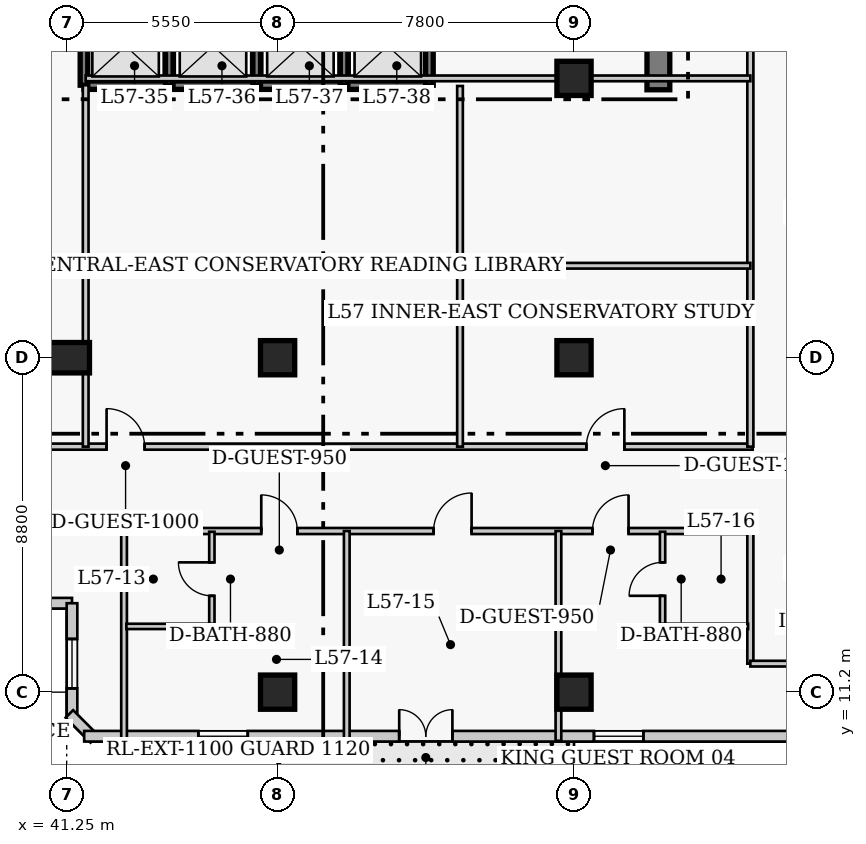
"""IFC4 building model, lengths in metres.
Left out: names, types, materials, properties, quantities, classifications, styles, units other than length and angle.
Written with IfcOpenShell. Run it as: python <this file> out.ifc"""

import sys

from ifc_helpers import new_model, si_unit, direction, frame, frame_2d, origin, origin_2d, place, context, subcontext, project, spatial, rectangle, extrude, element, fill, save


model = new_model("IFC4")
c1 = context("Model", 3, precision=1e-05, world=origin(), true_north=direction((0.0, 1.0)))
c2 = subcontext(c1, "Body", "Model", "MODEL_VIEW")
j1 = project(units=[si_unit("LENGTHUNIT", "METRE"), si_unit("PLANEANGLEUNIT", "RADIAN")], contexts=[c1])
p1 = place(None, origin())
s1 = spatial("IfcSite", under=j1, at=p1, CompositionType="ELEMENT")
p2 = place(p1, origin())
s2 = spatial("IfcBuilding", under=s1, at=p2, CompositionType="ELEMENT")
p3 = place(p2, frame((0.0, 0.0, 228.0)))
s3 = spatial("IfcBuildingStorey", under=s2, at=p3, CompositionType="ELEMENT", Elevation=228.0)
p4 = place(p3, frame((56.82, 27.05, 0.0), z_axis=(0.0, 0.0, 1.0), x_axis=(0.0, 1.0, 0.0)))
e1 = element("IfcWall", 1, at=p4, inside=s3, PredefinedType="SHEAR", context=c2, shape_type="SweptSolid", body=[
    extrude(rectangle(XDim=13.57, YDim=0.6, at=frame_2d((6.785, 0.0))), origin(), (0.0, 0.0, 1.0), 3.9),
])
p5 = place(p3, frame((41.25, 20.0, 0.0), z_axis=(0.0, 0.0, 1.0), x_axis=(1.0, 0.0, 0.0)))
e2 = element("IfcColumn", 2, at=p5, inside=s3, PredefinedType="COLUMN", context=c2, shape_type="SweptSolid", body=[
    extrude(rectangle(XDim=1.2, YDim=0.8, at=origin_2d()), origin(), (0.0, 0.0, 1.0), 3.9),
])
for number, where, z_axis, x_axis in (
    (3, (46.8, 11.2, 0.0), (0.0, 0.0, 1.0), (1.0, 0.0, 0.0)),
    (4, (46.8, 20.0, 0.0), (0.0, 0.0, 1.0), (1.0, 0.0, 0.0)),
    (5, (54.6, 11.2, 0.0), (0.0, 0.0, 1.0), (1.0, 0.0, 0.0)),
    (6, (54.6, 20.0, 0.0), (0.0, 0.0, 1.0), (1.0, 0.0, 0.0)),
    (7, (54.6, 27.35, 0.0), (0.0, 0.0, 1.0), (1.0, 0.0, 0.0)),
):
    element("IfcColumn", number, at=place(p3, frame(where, z_axis=z_axis, x_axis=x_axis)), inside=s3, PredefinedType="COLUMN", context=c2, shape_type="SweptSolid", body=[
        extrude(rectangle(XDim=0.9, YDim=0.9, at=origin_2d()), origin(), (0.0, 0.0, 1.0), 3.9),
    ])
p6 = place(p3, frame((36.61, 13.54, 0.0), z_axis=(0.0, 0.0, 1.0), x_axis=(1.0, 0.0, 0.0)))
e8 = element("IfcWall", 8, at=p6, inside=s3, PredefinedType="SOLIDWALL", context=c2, shape_type="SweptSolid", body=[
    extrude(rectangle(XDim=4.78, YDim=0.28, at=frame_2d((2.39, 0.0))), origin(), (0.0, 0.0, 1.0), 3.56),
])
p7 = place(p6, frame((1.74, 0.0, 0.85)))
e9 = element("IfcOpeningElement", 9, at=p7, cuts=e8, PredefinedType="OPENING", context=c2, shape_type="SweptSolid", body=[
    extrude(rectangle(XDim=1.3, YDim=1.7, at=frame_2d((0.65, 0.85))), frame((0.0, 0.15, 0.0), z_axis=(0.0, -1.0, 0.0), x_axis=(1.0, 0.0, 0.0)), (0.0, 0.0, 1.0), 0.3),
])
p8 = place(p3, frame((41.39, 13.54, 0.0), z_axis=(0.0, 0.0, 1.0), x_axis=(0.0, -1.0, 0.0)))
e10 = element("IfcWall", 10, at=p8, inside=s3, PredefinedType="SOLIDWALL", context=c2, shape_type="SweptSolid", body=[
    extrude(rectangle(XDim=3.18, YDim=0.28, at=frame_2d((1.59, 0.0))), origin(), (0.0, 0.0, 1.0), 3.56),
])
p9 = place(p8, frame((0.94, 0.0, 0.85)))
e11 = element("IfcOpeningElement", 11, at=p9, cuts=e10, PredefinedType="OPENING", context=c2, shape_type="SweptSolid", body=[
    extrude(rectangle(XDim=1.3, YDim=1.7, at=frame_2d((0.65, 0.85))), frame((0.0, 0.15, 0.0), z_axis=(0.0, -1.0, 0.0), x_axis=(1.0, 0.0, 0.0)), (0.0, 0.0, 1.0), 0.3),
])
p10 = place(p3, frame((41.321, 10.627, 0.0), z_axis=(0.0, 0.0, 1.0), x_axis=(0.707106781187, -0.707106781187, 0.0)))
e12 = element("IfcWall", 12, at=p10, inside=s3, PredefinedType="SOLIDWALL", context=c2, shape_type="SweptSolid", body=[
    extrude(rectangle(XDim=0.928, YDim=0.28, at=frame_2d((0.464, 0.0))), origin(), (0.0, 0.0, 1.0), 3.56),
])
p11 = place(p3, frame((41.71, 10.04, 0.0), z_axis=(0.0, 0.0, 1.0), x_axis=(1.0, 0.0, 0.0)))
e13 = element("IfcWall", 13, at=p11, inside=s3, PredefinedType="SOLIDWALL", context=c2, shape_type="SweptSolid", body=[
    extrude(rectangle(XDim=25.83, YDim=0.28, at=frame_2d((12.915, 0.0))), origin(), (0.0, 0.0, 1.0), 3.56),
])
p12 = place(p11, frame((8.29, 0.0, 0.0)))
e14 = element("IfcOpeningElement", 14, at=p12, cuts=e13, PredefinedType="OPENING", context=c2, shape_type="SweptSolid", body=[
    extrude(rectangle(XDim=1.4, YDim=2.15, at=frame_2d((0.7, 1.075))), frame((0.0, 0.15, 0.0), z_axis=(0.0, -1.0, 0.0), x_axis=(1.0, 0.0, 0.0)), (0.0, 0.0, 1.0), 0.3),
])
p13 = place(p11, frame((3.005, 0.0, 0.85)))
e15 = element("IfcOpeningElement", 15, at=p13, cuts=e13, PredefinedType="OPENING", context=c2, shape_type="SweptSolid", body=[
    extrude(rectangle(XDim=1.3, YDim=1.7, at=frame_2d((0.65, 0.85))), frame((0.0, 0.15, 0.0), z_axis=(0.0, -1.0, 0.0), x_axis=(1.0, 0.0, 0.0)), (0.0, 0.0, 1.0), 0.3),
])
p14 = place(p11, frame((13.415, 0.0, 0.85)))
e16 = element("IfcOpeningElement", 16, at=p14, cuts=e13, PredefinedType="OPENING", context=c2, shape_type="SweptSolid", body=[
    extrude(rectangle(XDim=1.3, YDim=1.7, at=frame_2d((0.65, 0.85))), frame((0.0, 0.15, 0.0), z_axis=(0.0, -1.0, 0.0), x_axis=(1.0, 0.0, 0.0)), (0.0, 0.0, 1.0), 0.3),
])
p15 = place(p11, frame((21.525, 0.0, 0.85)))
e17 = element("IfcOpeningElement", 17, at=p15, cuts=e13, PredefinedType="OPENING", context=c2, shape_type="SweptSolid", body=[
    extrude(rectangle(XDim=1.3, YDim=1.7, at=frame_2d((0.65, 0.85))), frame((0.0, 0.15, 0.0), z_axis=(0.0, -1.0, 0.0), x_axis=(1.0, 0.0, 0.0)), (0.0, 0.0, 1.0), 0.3),
])
p16 = place(p3, frame((41.705, 27.17, 0.0), z_axis=(0.0, 0.0, 1.0), x_axis=(1.0, 0.0, 0.0)))
e18 = element("IfcWall", 18, at=p16, inside=s3, PredefinedType="SHEAR", context=c2, shape_type="SweptSolid", body=[
    extrude(rectangle(XDim=2.245, YDim=0.22, at=frame_2d((1.123, 0.0))), origin(), (0.0, 0.0, 1.0), 3.9),
])
p17 = place(p3, frame((41.705, 27.17, 0.0), z_axis=(0.0, 0.0, 1.0), x_axis=(0.0, 1.0, 0.0)))
e19 = element("IfcWall", 19, at=p17, inside=s3, PredefinedType="SHEAR", context=c2, shape_type="SweptSolid", body=[
    extrude(rectangle(XDim=2.06, YDim=0.2, at=frame_2d((1.03, 0.0))), origin(), (0.0, 0.0, 1.0), 3.9),
])
p18 = place(p3, frame((43.95, 27.17, 0.0), z_axis=(0.0, 0.0, 1.0), x_axis=(1.0, 0.0, 0.0)))
e20 = element("IfcWall", 20, at=p18, inside=s3, PredefinedType="SHEAR", context=c2, shape_type="SweptSolid", body=[
    extrude(rectangle(XDim=2.3, YDim=0.22, at=frame_2d((1.15, 0.0))), origin(), (0.0, 0.0, 1.0), 3.9),
])
p19 = place(p3, frame((43.95, 27.17, 0.0), z_axis=(0.0, 0.0, 1.0), x_axis=(0.0, 1.0, 0.0)))
e21 = element("IfcWall", 21, at=p19, inside=s3, PredefinedType="SHEAR", context=c2, shape_type="SweptSolid", body=[
    extrude(rectangle(XDim=2.06, YDim=0.2, at=frame_2d((1.03, 0.0))), origin(), (0.0, 0.0, 1.0), 3.9),
])
p20 = place(p3, frame((46.25, 27.17, 0.0), z_axis=(0.0, 0.0, 1.0), x_axis=(1.0, 0.0, 0.0)))
e22 = element("IfcWall", 22, at=p20, inside=s3, PredefinedType="SHEAR", context=c2, shape_type="SweptSolid", body=[
    extrude(rectangle(XDim=2.3, YDim=0.22, at=frame_2d((1.15, 0.0))), origin(), (0.0, 0.0, 1.0), 3.9),
])
p21 = place(p3, frame((46.25, 27.17, 0.0), z_axis=(0.0, 0.0, 1.0), x_axis=(0.0, 1.0, 0.0)))
e23 = element("IfcWall", 23, at=p21, inside=s3, PredefinedType="SHEAR", context=c2, shape_type="SweptSolid", body=[
    extrude(rectangle(XDim=2.06, YDim=0.2, at=frame_2d((1.03, 0.0))), origin(), (0.0, 0.0, 1.0), 3.9),
])
p22 = place(p3, frame((48.55, 27.17, 0.0), z_axis=(0.0, 0.0, 1.0), x_axis=(1.0, 0.0, 0.0)))
e24 = element("IfcWall", 24, at=p22, inside=s3, PredefinedType="SHEAR", context=c2, shape_type="SweptSolid", body=[
    extrude(rectangle(XDim=2.245, YDim=0.22, at=frame_2d((1.123, 0.0))), origin(), (0.0, 0.0, 1.0), 3.9),
])
for number, where, z_axis, x_axis in (
    (25, (48.55, 27.17, 0.0), (0.0, 0.0, 1.0), (0.0, 1.0, 0.0)),
    (26, (50.795, 27.17, 0.0), (0.0, 0.0, 1.0), (0.0, 1.0, 0.0)),
):
    element("IfcWall", number, at=place(p3, frame(where, z_axis=z_axis, x_axis=x_axis)), inside=s3, PredefinedType="SHEAR", context=c2, shape_type="SweptSolid", body=[
        extrude(rectangle(XDim=2.06, YDim=0.2, at=frame_2d((1.03, 0.0))), origin(), (0.0, 0.0, 1.0), 3.9),
    ])
p23 = place(p3, frame((35.85, 17.66, 0.0), z_axis=(0.0, 0.0, 1.0), x_axis=(1.0, 0.0, 0.0)))
e27 = element("IfcWall", 27, at=p23, inside=s3, PredefinedType="PARTITIONING", context=c2, shape_type="SweptSolid", body=[
    extrude(rectangle(XDim=23.45, YDim=0.16, at=frame_2d((11.725, 0.0))), origin(), (0.0, 0.0, 1.0), 3.56),
])
p24 = place(p23, frame((6.45, 0.0, 0.0)))
e28 = element("IfcOpeningElement", 28, at=p24, cuts=e27, PredefinedType="OPENING", context=c2, shape_type="SweptSolid", body=[
    extrude(rectangle(XDim=1.0, YDim=2.15, at=frame_2d((0.5, 1.075))), frame((0.0, 0.09, 0.0), z_axis=(0.0, -1.0, 0.0), x_axis=(1.0, 0.0, 0.0)), (0.0, 0.0, 1.0), 0.18),
])
p25 = place(p23, frame((19.075, 0.0, 0.0)))
e29 = element("IfcOpeningElement", 29, at=p25, cuts=e27, PredefinedType="OPENING", context=c2, shape_type="SweptSolid", body=[
    extrude(rectangle(XDim=1.0, YDim=2.15, at=frame_2d((0.5, 1.075))), frame((0.0, 0.09, 0.0), z_axis=(0.0, -1.0, 0.0), x_axis=(1.0, 0.0, 0.0)), (0.0, 0.0, 1.0), 0.18),
])
p26 = place(p3, frame((35.8, 15.44, 0.0), z_axis=(0.0, 0.0, 1.0), x_axis=(1.0, 0.0, 0.0)))
e30 = element("IfcWall", 30, at=p26, inside=s3, PredefinedType="PARTITIONING", context=c2, shape_type="SweptSolid", body=[
    extrude(rectangle(XDim=23.5, YDim=0.16, at=frame_2d((11.75, 0.0))), origin(), (0.0, 0.0, 1.0), 3.56),
])
p27 = place(p26, frame((10.57, 0.0, 0.0)))
e31 = element("IfcOpeningElement", 31, at=p27, cuts=e30, PredefinedType="OPENING", context=c2, shape_type="SweptSolid", body=[
    extrude(rectangle(XDim=0.95, YDim=2.1, at=frame_2d((0.475, 1.05))), frame((0.0, 0.09, 0.0), z_axis=(0.0, -1.0, 0.0), x_axis=(1.0, 0.0, 0.0)), (0.0, 0.0, 1.0), 0.18),
])
p28 = place(p26, frame((15.105, 0.0, 0.0)))
e32 = element("IfcOpeningElement", 32, at=p28, cuts=e30, PredefinedType="OPENING", context=c2, shape_type="SweptSolid", body=[
    extrude(rectangle(XDim=1.0, YDim=2.15, at=frame_2d((0.5, 1.075))), frame((0.0, 0.09, 0.0), z_axis=(0.0, -1.0, 0.0), x_axis=(1.0, 0.0, 0.0)), (0.0, 0.0, 1.0), 0.18),
])
p29 = place(p26, frame((19.285, 0.0, 0.0)))
e33 = element("IfcOpeningElement", 33, at=p29, cuts=e30, PredefinedType="OPENING", context=c2, shape_type="SweptSolid", body=[
    extrude(rectangle(XDim=0.95, YDim=2.1, at=frame_2d((0.475, 1.05))), frame((0.0, 0.09, 0.0), z_axis=(0.0, -1.0, 0.0), x_axis=(1.0, 0.0, 0.0)), (0.0, 0.0, 1.0), 0.18),
])
p30 = place(p3, frame((59.24, 17.66, 0.0), z_axis=(0.0, 0.0, 1.0), x_axis=(0.0, 1.0, 0.0)))
e34 = element("IfcWall", 34, at=p30, inside=s3, PredefinedType="PARTITIONING", context=c2, shape_type="SweptSolid", body=[
    extrude(rectangle(XDim=22.99, YDim=0.16, at=frame_2d((11.495, 0.0))), origin(), (0.0, 0.0, 1.0), 3.56),
])
p31 = place(p3, frame((59.24, 11.95, 0.0), z_axis=(0.0, 0.0, 1.0), x_axis=(0.0, 1.0, 0.0)))
e35 = element("IfcWall", 35, at=p31, inside=s3, PredefinedType="PARTITIONING", context=c2, shape_type="SweptSolid", body=[
    extrude(rectangle(XDim=3.49, YDim=0.16, at=frame_2d((1.745, 0.0))), origin(), (0.0, 0.0, 1.0), 3.56),
])
p32 = place(p3, frame((59.24, 11.95, 0.0), z_axis=(0.0, 0.0, 1.0), x_axis=(1.0, 0.0, 0.0)))
e36 = element("IfcWall", 36, at=p32, inside=s3, PredefinedType="PARTITIONING", context=c2, shape_type="SweptSolid", body=[
    extrude(rectangle(XDim=2.22, YDim=0.15, at=frame_2d((1.11, 0.0))), origin(), (0.0, 0.0, 1.0), 3.56),
])
p33 = place(p3, frame((41.75, 17.66, 0.0), z_axis=(0.0, 0.0, 1.0), x_axis=(0.0, 1.0, 0.0)))
e37 = element("IfcWall", 37, at=p33, inside=s3, PredefinedType="PARTITIONING", context=c2, shape_type="SweptSolid", body=[
    extrude(rectangle(XDim=9.51, YDim=0.15, at=frame_2d((4.755, 0.0))), origin(), (0.0, 0.0, 1.0), 3.56),
])
p34 = place(p3, frame((51.6, 17.66, 0.0), z_axis=(0.0, 0.0, 1.0), x_axis=(0.0, 1.0, 0.0)))
e38 = element("IfcWall", 38, at=p34, inside=s3, PredefinedType="PARTITIONING", context=c2, shape_type="SweptSolid", body=[
    extrude(rectangle(XDim=9.49, YDim=0.15, at=frame_2d((4.745, 0.0))), origin(), (0.0, 0.0, 1.0), 3.56),
])
p35 = place(p3, frame((41.75, 27.35, 0.0), z_axis=(0.0, 0.0, 1.0), x_axis=(1.0, 0.0, 0.0)))
e39 = element("IfcWall", 39, at=p35, inside=s3, PredefinedType="PARTITIONING", context=c2, shape_type="SweptSolid", body=[
    extrude(rectangle(XDim=17.49, YDim=0.15, at=frame_2d((8.745, 0.0))), origin(), (0.0, 0.0, 1.0), 3.56),
])
p36 = place(p3, frame((51.6, 22.42, 0.0), z_axis=(0.0, 0.0, 1.0), x_axis=(1.0, 0.0, 0.0)))
e40 = element("IfcWall", 40, at=p36, inside=s3, PredefinedType="PARTITIONING", context=c2, shape_type="SweptSolid", body=[
    extrude(rectangle(XDim=7.64, YDim=0.15, at=frame_2d((3.82, 0.0))), origin(), (0.0, 0.0, 1.0), 3.56),
])
p37 = place(p3, frame((42.76, 9.92, 0.0), z_axis=(0.0, 0.0, 1.0), x_axis=(0.0, 1.0, 0.0)))
e41 = element("IfcWall", 41, at=p37, inside=s3, PredefinedType="PARTITIONING", context=c2, shape_type="SweptSolid", body=[
    extrude(rectangle(XDim=5.52, YDim=0.15, at=frame_2d((2.76, 0.0))), origin(), (0.0, 0.0, 1.0), 3.56),
])
p38 = place(p3, frame((45.07, 12.93, 0.0), z_axis=(0.0, 0.0, 1.0), x_axis=(0.0, 1.0, 0.0)))
e42 = element("IfcWall", 42, at=p38, inside=s3, PredefinedType="PLUMBINGWALL", context=c2, shape_type="SweptSolid", body=[
    extrude(rectangle(XDim=2.49, YDim=0.14, at=frame_2d((1.245, 0.0))), origin(), (0.0, 0.0, 1.0), 3.56),
])
p39 = place(p38, frame((0.805, 0.0, 0.0)))
e43 = element("IfcOpeningElement", 43, at=p39, cuts=e42, PredefinedType="OPENING", context=c2, shape_type="SweptSolid", body=[
    extrude(rectangle(XDim=0.88, YDim=2.05, at=frame_2d((0.44, 1.025))), frame((0.0, 0.08, 0.0), z_axis=(0.0, -1.0, 0.0), x_axis=(1.0, 0.0, 0.0)), (0.0, 0.0, 1.0), 0.16),
])
p40 = place(p3, frame((42.82, 12.93, 0.0), z_axis=(0.0, 0.0, 1.0), x_axis=(1.0, 0.0, 0.0)))
e44 = element("IfcWall", 44, at=p40, inside=s3, PredefinedType="PLUMBINGWALL", context=c2, shape_type="SweptSolid", body=[
    extrude(rectangle(XDim=2.25, YDim=0.14, at=frame_2d((1.125, 0.0))), origin(), (0.0, 0.0, 1.0), 3.56),
])
for number, where, z_axis, x_axis in (
    (45, (48.62, 9.92, 0.0), (0.0, 0.0, 1.0), (0.0, 1.0, 0.0)),
    (46, (54.19, 9.92, 0.0), (0.0, 0.0, 1.0), (0.0, 1.0, 0.0)),
):
    element("IfcWall", number, at=place(p3, frame(where, z_axis=z_axis, x_axis=x_axis)), inside=s3, PredefinedType="PARTITIONING", context=c2, shape_type="SweptSolid", body=[
        extrude(rectangle(XDim=5.52, YDim=0.15, at=frame_2d((2.76, 0.0))), origin(), (0.0, 0.0, 1.0), 3.56),
    ])
p41 = place(p3, frame((56.93, 12.93, 0.0), z_axis=(0.0, 0.0, 1.0), x_axis=(0.0, 1.0, 0.0)))
e47 = element("IfcWall", 47, at=p41, inside=s3, PredefinedType="PLUMBINGWALL", context=c2, shape_type="SweptSolid", body=[
    extrude(rectangle(XDim=2.49, YDim=0.14, at=frame_2d((1.245, 0.0))), origin(), (0.0, 0.0, 1.0), 3.56),
])
p42 = place(p41, frame((0.805, 0.0, 0.0)))
e48 = element("IfcOpeningElement", 48, at=p42, cuts=e47, PredefinedType="OPENING", context=c2, shape_type="SweptSolid", body=[
    extrude(rectangle(XDim=0.88, YDim=2.05, at=frame_2d((0.44, 1.025))), frame((0.0, 0.08, 0.0), z_axis=(0.0, -1.0, 0.0), x_axis=(1.0, 0.0, 0.0)), (0.0, 0.0, 1.0), 0.16),
])
p43 = place(p3, frame((56.93, 12.93, 0.0), z_axis=(0.0, 0.0, 1.0), x_axis=(1.0, 0.0, 0.0)))
e49 = element("IfcWall", 49, at=p43, inside=s3, PredefinedType="PLUMBINGWALL", context=c2, shape_type="SweptSolid", body=[
    extrude(rectangle(XDim=2.25, YDim=0.14, at=frame_2d((1.125, 0.0))), origin(), (0.0, 0.0, 1.0), 3.56),
])
p44 = place(p9, origin())
e50 = element("IfcWindow", 50, at=p44, inside=s3, PartitioningType="SINGLE_PANEL", PredefinedType="WINDOW", context=c2, shape_type="SweptSolid", body=[
    extrude(rectangle(XDim=1.3, YDim=1.7, at=frame_2d((0.65, 0.85))), frame((0.0, 0.03, 0.0), z_axis=(0.0, -1.0, 0.0), x_axis=(1.0, 0.0, 0.0)), (0.0, 0.0, 1.0), 0.06),
])
fill(e11, e50)
p45 = place(p12, origin())
e51 = element("IfcDoor", 51, at=p45, inside=s3, OperationType="DOUBLE_DOOR_SINGLE_SWING", PredefinedType="DOOR", context=c2, shape_type="SweptSolid", body=[
    extrude(rectangle(XDim=1.4, YDim=2.15, at=frame_2d((0.7, 1.075))), frame((0.0, 0.025, 0.0), z_axis=(0.0, -1.0, 0.0), x_axis=(1.0, 0.0, 0.0)), (0.0, 0.0, 1.0), 0.05),
])
fill(e14, e51)
p46 = place(p13, origin())
e52 = element("IfcWindow", 52, at=p46, inside=s3, PartitioningType="SINGLE_PANEL", PredefinedType="WINDOW", context=c2, shape_type="SweptSolid", body=[
    extrude(rectangle(XDim=1.3, YDim=1.7, at=frame_2d((0.65, 0.85))), frame((0.0, 0.03, 0.0), z_axis=(0.0, -1.0, 0.0), x_axis=(1.0, 0.0, 0.0)), (0.0, 0.0, 1.0), 0.06),
])
fill(e15, e52)
p47 = place(p14, origin())
e53 = element("IfcWindow", 53, at=p47, inside=s3, PartitioningType="SINGLE_PANEL", PredefinedType="WINDOW", context=c2, shape_type="SweptSolid", body=[
    extrude(rectangle(XDim=1.3, YDim=1.7, at=frame_2d((0.65, 0.85))), frame((0.0, 0.03, 0.0), z_axis=(0.0, -1.0, 0.0), x_axis=(1.0, 0.0, 0.0)), (0.0, 0.0, 1.0), 0.06),
])
fill(e16, e53)
p48 = place(p24, origin())
e54 = element("IfcDoor", 54, at=p48, inside=s3, OperationType="SINGLE_SWING_LEFT", PredefinedType="DOOR", context=c2, shape_type="SweptSolid", body=[
    extrude(rectangle(XDim=1.0, YDim=2.15, at=frame_2d((0.5, 1.075))), frame((0.0, 0.025, 0.0), z_axis=(0.0, -1.0, 0.0), x_axis=(1.0, 0.0, 0.0)), (0.0, 0.0, 1.0), 0.05),
])
fill(e28, e54)
p49 = place(p25, origin())
e55 = element("IfcDoor", 55, at=p49, inside=s3, OperationType="SINGLE_SWING_RIGHT", PredefinedType="DOOR", context=c2, shape_type="SweptSolid", body=[
    extrude(rectangle(XDim=1.0, YDim=2.15, at=frame_2d((0.5, 1.075))), frame((0.0, 0.025, 0.0), z_axis=(0.0, -1.0, 0.0), x_axis=(1.0, 0.0, 0.0)), (0.0, 0.0, 1.0), 0.05),
])
fill(e29, e55)
p50 = place(p39, origin())
e56 = element("IfcDoor", 56, at=p50, inside=s3, OperationType="SINGLE_SWING_RIGHT", PredefinedType="DOOR", context=c2, shape_type="SweptSolid", body=[
    extrude(rectangle(XDim=0.88, YDim=2.05, at=frame_2d((0.44, 1.025))), frame((0.0, 0.025, 0.0), z_axis=(0.0, -1.0, 0.0), x_axis=(1.0, 0.0, 0.0)), (0.0, 0.0, 1.0), 0.05),
])
fill(e43, e56)
p51 = place(p27, origin())
e57 = element("IfcDoor", 57, at=p51, inside=s3, OperationType="SINGLE_SWING_LEFT", PredefinedType="DOOR", context=c2, shape_type="SweptSolid", body=[
    extrude(rectangle(XDim=0.95, YDim=2.1, at=frame_2d((0.475, 1.05))), frame((0.0, 0.025, 0.0), z_axis=(0.0, -1.0, 0.0), x_axis=(1.0, 0.0, 0.0)), (0.0, 0.0, 1.0), 0.05),
])
fill(e31, e57)
p52 = place(p28, origin())
e58 = element("IfcDoor", 58, at=p52, inside=s3, OperationType="SINGLE_SWING_RIGHT", PredefinedType="DOOR", context=c2, shape_type="SweptSolid", body=[
    extrude(rectangle(XDim=1.0, YDim=2.15, at=frame_2d((0.5, 1.075))), frame((0.0, 0.025, 0.0), z_axis=(0.0, -1.0, 0.0), x_axis=(1.0, 0.0, 0.0)), (0.0, 0.0, 1.0), 0.05),
])
fill(e32, e58)
p53 = place(p42, origin())
e59 = element("IfcDoor", 59, at=p53, inside=s3, OperationType="SINGLE_SWING_LEFT", PredefinedType="DOOR", context=c2, shape_type="SweptSolid", body=[
    extrude(rectangle(XDim=0.88, YDim=2.05, at=frame_2d((0.44, 1.025))), frame((0.0, 0.025, 0.0), z_axis=(0.0, -1.0, 0.0), x_axis=(1.0, 0.0, 0.0)), (0.0, 0.0, 1.0), 0.05),
])
fill(e48, e59)
p54 = place(p29, origin())
e60 = element("IfcDoor", 60, at=p54, inside=s3, OperationType="SINGLE_SWING_RIGHT", PredefinedType="DOOR", context=c2, shape_type="SweptSolid", body=[
    extrude(rectangle(XDim=0.95, YDim=2.1, at=frame_2d((0.475, 1.05))), frame((0.0, 0.025, 0.0), z_axis=(0.0, -1.0, 0.0), x_axis=(1.0, 0.0, 0.0)), (0.0, 0.0, 1.0), 0.05),
])
fill(e33, e60)
save(model, sys.argv[1])
